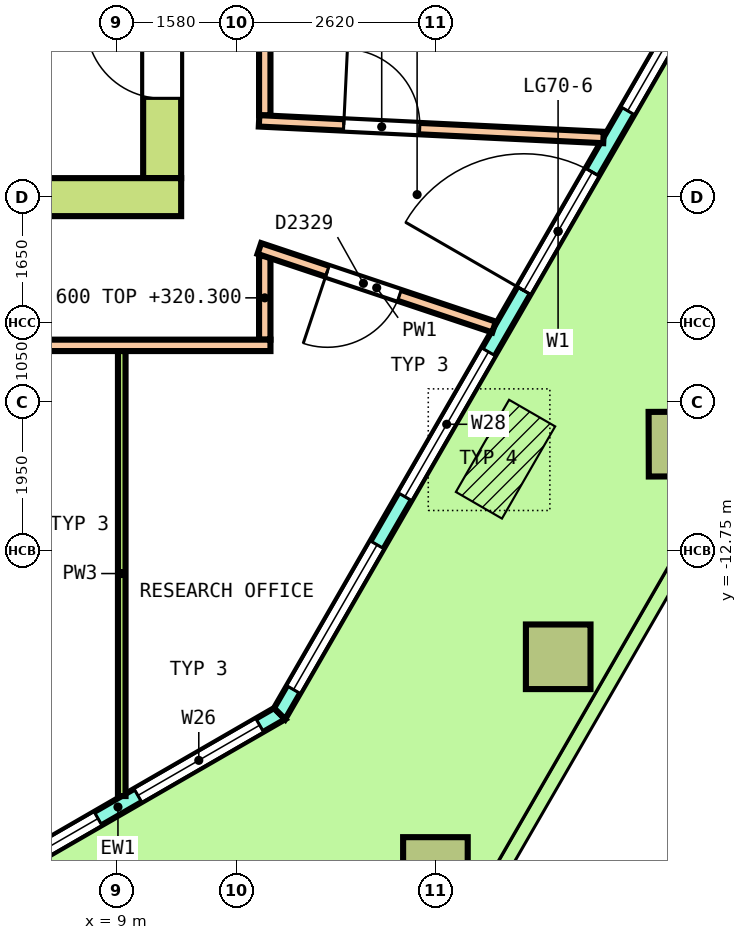
"""IFC4 building model, lengths in metres.
Left out: names, types, materials, properties, quantities, classifications, styles, units other than length and angle.
Written with IfcOpenShell. Run it as: python <this file> out.ifc"""

import sys

from ifc_helpers import new_model, si_unit, direction, frame, frame_2d, origin, origin_2d, place, context, subcontext, project, spatial, polyline, rectangle, outline, extrude, element, fill, save


model = new_model("IFC4")
c1 = context("Model", 3, precision=1e-05, world=origin(), true_north=direction((0.0, 1.0)))
c2 = subcontext(c1, "Body", "Model", "MODEL_VIEW")
j1 = project(units=[si_unit("LENGTHUNIT", "METRE"), si_unit("PLANEANGLEUNIT", "RADIAN")], contexts=[c1])
p1 = place(None, origin())
s1 = spatial("IfcSite", under=j1, at=p1, CompositionType="ELEMENT")
p2 = place(p1, origin())
s2 = spatial("IfcBuilding", under=s1, at=p2, CompositionType="ELEMENT")
p3 = place(p2, frame((0.0, 0.0, 316.6)))
s3 = spatial("IfcBuildingStorey", under=s2, at=p3, CompositionType="ELEMENT", Elevation=316.6)
p4 = place(p3, frame((13.195, -16.945, 0.0), z_axis=(-0.018115165867, -0.031417446337, 0.999342176049), x_axis=(0.499559043097, 0.865520391176, 0.036265891942)))
e1 = element("IfcColumn", 1, at=p4, inside=s3, PredefinedType="COLUMN", context=c2, shape_type="SweptSolid", body=[
    extrude(rectangle(XDim=0.85, YDim=0.85, at=origin_2d()), origin(), (0.0, 0.0, 1.0), 3.652),
])
p5 = place(p3, frame((14.811, -14.147, 0.0), z_axis=(-0.010833557325, -0.018858414602, 0.999763469144), x_axis=(0.498285075857, 0.866740432575, 0.0217486946)))
e2 = element("IfcColumn", 2, at=p5, inside=s3, PredefinedType="COLUMN", context=c2, shape_type="SweptSolid", body=[
    extrude(rectangle(XDim=0.85, YDim=0.85, at=origin_2d()), origin(), (0.0, 0.0, 1.0), 3.651),
])
p6 = place(p3, frame((16.426, -11.349, 0.0), z_axis=(-0.003678832152, -0.006287458586, 0.999973466677), x_axis=(0.502203462203, 0.864718808148, 0.007284599223)))
e3 = element("IfcColumn", 3, at=p6, inside=s3, PredefinedType="COLUMN", context=c2, shape_type="SweptSolid", body=[
    extrude(rectangle(XDim=0.85, YDim=0.85, at=origin_2d()), origin(), (0.0, 0.0, 1.0), 3.65),
])
p7 = place(p3, frame((6.892, -17.351, 0.0), z_axis=(0.0, 0.0, 1.0), x_axis=(0.866029143232, 0.499993523031, 0.0)))
e4 = element("IfcWall", 4, at=p7, inside=s3, PredefinedType="SOLIDWALL", context=c2, shape_type="SweptSolid", body=[
    extrude(outline(polyline([(-0.027, -0.1), (1.214, -0.1), (2.456, -0.1), (3.697, -0.1), (4.938, -0.1), (4.885, 0.1), (3.67, 0.1), (2.456, 0.1), (1.241, 0.1), (0.027, 0.1), (-0.027, -0.1)])), origin(), (0.0, 0.0, 1.0), 3.7),
])
p8 = place(p7, frame((0.303, 0.0, 0.1)))
e5 = element("IfcOpeningElement", 5, at=p8, cuts=e4, PredefinedType="OPENING", context=c2, shape_type="SweptSolid", body=[
    extrude(rectangle(XDim=1.85, YDim=2.9, at=frame_2d((0.925, 1.45))), frame((0.0, 0.11, 0.0), z_axis=(0.0, -1.0, 0.0), x_axis=(1.0, 0.0, 0.0)), (0.0, 0.0, 1.0), 0.22),
])
p9 = place(p7, frame((2.759, 0.0, 0.1)))
e6 = element("IfcOpeningElement", 6, at=p9, cuts=e4, PredefinedType="OPENING", context=c2, shape_type="SweptSolid", body=[
    extrude(rectangle(XDim=1.85, YDim=2.9, at=frame_2d((0.925, 1.45))), frame((0.0, 0.11, 0.0), z_axis=(0.0, -1.0, 0.0), x_axis=(1.0, 0.0, 0.0)), (0.0, 0.0, 1.0), 0.22),
])
p10 = place(p3, frame((11.146, -14.896, 0.0), z_axis=(0.0, 0.0, 1.0), x_axis=(0.499995013995, 0.866028282437, 0.0)))
e7 = element("IfcWall", 7, at=p10, inside=s3, PredefinedType="SOLIDWALL", context=c2, shape_type="SweptSolid", body=[
    extrude(outline(polyline([(-0.027, -0.1), (1.024, -0.1), (2.074, -0.1), (3.125, -0.1), (4.176, -0.1), (5.226, -0.1), (6.277, -0.1), (7.327, -0.1), (8.378, -0.1), (9.428, -0.1), (10.479, -0.1), (11.53, -0.1), (12.58, -0.1), (13.631, -0.1), (14.681, -0.1), (14.628, 0.1), (13.585, 0.1), (12.542, 0.1), (11.499, 0.1), (10.456, 0.1), (9.413, 0.1), (8.37, 0.1), (7.327, 0.1), (6.284, 0.1), (5.241, 0.1), (4.198, 0.1), (3.156, 0.1), (2.113, 0.1), (1.07, 0.1), (0.027, 0.1), (-0.027, -0.1)])), origin(), (0.0, 0.0, 1.0), 3.7),
])
p11 = place(p10, frame((0.365, 0.0, 0.1)))
e8 = element("IfcOpeningElement", 8, at=p11, cuts=e7, PredefinedType="OPENING", context=c2, shape_type="SweptSolid", body=[
    extrude(rectangle(XDim=2.2, YDim=2.9, at=frame_2d((1.1, 1.45))), frame((0.0, 0.11, 0.0), z_axis=(0.0, -1.0, 0.0), x_axis=(1.0, 0.0, 0.0)), (0.0, 0.0, 1.0), 0.22),
])
p12 = place(p10, frame((3.296, 0.0, 0.1)))
e9 = element("IfcOpeningElement", 9, at=p12, cuts=e7, PredefinedType="OPENING", context=c2, shape_type="SweptSolid", body=[
    extrude(rectangle(XDim=2.2, YDim=2.9, at=frame_2d((1.1, 1.45))), frame((0.0, 0.11, 0.0), z_axis=(0.0, -1.0, 0.0), x_axis=(1.0, 0.0, 0.0)), (0.0, 0.0, 1.0), 0.22),
])
p13 = place(p10, frame((6.427, 0.0, 0.0)))
e10 = element("IfcOpeningElement", 10, at=p13, cuts=e7, PredefinedType="OPENING", context=c2, shape_type="SweptSolid", body=[
    extrude(rectangle(XDim=1.8, YDim=2.4, at=frame_2d((0.9, 1.2))), frame((0.0, 0.11, 0.0), z_axis=(0.0, -1.0, 0.0), x_axis=(1.0, 0.0, 0.0)), (0.0, 0.0, 1.0), 0.22),
])
p14 = place(p10, frame((6.427, 0.0, 2.55)))
e11 = element("IfcOpeningElement", 11, at=p14, cuts=e7, PredefinedType="OPENING", context=c2, shape_type="SweptSolid", body=[
    extrude(rectangle(XDim=1.8, YDim=0.45, at=frame_2d((0.9, 0.225))), frame((0.0, 0.11, 0.0), z_axis=(0.0, -1.0, 0.0), x_axis=(1.0, 0.0, 0.0)), (0.0, 0.0, 1.0), 0.22),
])
p15 = place(p10, frame((9.158, 0.0, 0.1)))
e12 = element("IfcOpeningElement", 12, at=p15, cuts=e7, PredefinedType="OPENING", context=c2, shape_type="SweptSolid", body=[
    extrude(rectangle(XDim=2.2, YDim=2.9, at=frame_2d((1.1, 1.45))), frame((0.0, 0.11, 0.0), z_axis=(0.0, -1.0, 0.0), x_axis=(1.0, 0.0, 0.0)), (0.0, 0.0, 1.0), 0.22),
])
p16 = place(p10, frame((12.089, 0.0, 0.1)))
e13 = element("IfcOpeningElement", 13, at=p16, cuts=e7, PredefinedType="OPENING", context=c2, shape_type="SweptSolid", body=[
    extrude(rectangle(XDim=2.2, YDim=2.9, at=frame_2d((1.1, 1.45))), frame((0.0, 0.11, 0.0), z_axis=(0.0, -1.0, 0.0), x_axis=(1.0, 0.0, 0.0)), (0.0, 0.0, 1.0), 0.22),
])
p17 = place(p3, frame((-9.85, -8.1, 0.0), z_axis=(0.0, 0.0, 1.0), x_axis=(1.0, 0.0, 0.0)))
e14 = element("IfcWall", 14, at=p17, inside=s3, PredefinedType="SHEAR", context=c2, shape_type="SweptSolid", body=[
    extrude(rectangle(XDim=19.7, YDim=0.5, at=frame_2d((9.85, 0.0))), origin(), (0.0, 0.0, 1.0), 3.7),
])
p18 = place(p17, frame((11.4, 0.0, 0.0)))
e15 = element("IfcOpeningElement", 15, at=p18, cuts=e14, PredefinedType="OPENING", context=c2, shape_type="SweptSolid", body=[
    extrude(rectangle(XDim=1.2, YDim=2.1, at=frame_2d((0.6, 1.05))), frame((0.0, 0.26, 0.0), z_axis=(0.0, -1.0, 0.0), x_axis=(1.0, 0.0, 0.0)), (0.0, 0.0, 1.0), 0.52),
])
p19 = place(p3, frame((9.6, -7.85, 0.0), z_axis=(0.0, 0.0, 1.0), x_axis=(0.0, 1.0, 0.0)))
e16 = element("IfcWall", 16, at=p19, inside=s3, PredefinedType="SHEAR", context=c2, shape_type="SweptSolid", body=[
    extrude(rectangle(XDim=15.7, YDim=0.5, at=frame_2d((7.85, 0.0))), origin(), (0.0, 0.0, 1.0), 3.7),
])
p20 = place(p19, frame((6.65, 0.0, 0.0)))
e17 = element("IfcOpeningElement", 17, at=p20, cuts=e16, PredefinedType="OPENING", context=c2, shape_type="SweptSolid", body=[
    extrude(rectangle(XDim=2.4, YDim=2.1, at=frame_2d((1.2, 1.05))), frame((0.0, 0.26, 0.0), z_axis=(0.0, -1.0, 0.0), x_axis=(1.0, 0.0, 0.0)), (0.0, 0.0, 1.0), 0.52),
])
p21 = place(p19, frame((13.55, 0.0, 0.0)))
e18 = element("IfcOpeningElement", 18, at=p21, cuts=e16, PredefinedType="OPENING", context=c2, shape_type="SweptSolid", body=[
    extrude(rectangle(XDim=1.2, YDim=2.1, at=frame_2d((0.6, 1.05))), frame((0.0, 0.26, 0.0), z_axis=(0.0, -1.0, 0.0), x_axis=(1.0, 0.0, 0.0)), (0.0, 0.0, 1.0), 0.52),
])
p22 = place(p19, frame((1.05, 0.0, 0.0)))
e19 = element("IfcOpeningElement", 19, at=p22, cuts=e16, PredefinedType="OPENING", context=c2, shape_type="SweptSolid", body=[
    extrude(rectangle(XDim=1.0, YDim=2.1, at=frame_2d((0.5, 1.05))), frame((0.0, 0.26, 0.0), z_axis=(0.0, -1.0, 0.0), x_axis=(1.0, 0.0, 0.0)), (0.0, 0.0, 1.0), 0.52),
])
p23 = place(p3, frame((10.95, -9.975, 0.0), z_axis=(0.0, 0.0, 1.0), x_axis=(0.0, 1.0, 0.0)))
e20 = element("IfcWall", 20, at=p23, inside=s3, PredefinedType="PARTITIONING", context=c2, shape_type="SweptSolid", body=[
    extrude(rectangle(XDim=1.1, YDim=0.15, at=frame_2d((0.55, 0.0))), origin(), (0.0, 0.0, 1.0), 3.7),
])
p24 = place(p3, frame((10.95, -7.025, 0.0), z_axis=(0.0, 0.0, 1.0), x_axis=(0.0, 1.0, 0.0)))
e21 = element("IfcWall", 21, at=p24, inside=s3, PredefinedType="PARTITIONING", context=c2, shape_type="SweptSolid", body=[
    extrude(rectangle(XDim=17.0, YDim=0.15, at=frame_2d((8.5, 0.0))), origin(), (0.0, 0.0, 1.0), 3.05),
])
p25 = place(p24, frame((8.018, 0.0, 0.0)))
e22 = element("IfcOpeningElement", 22, at=p25, cuts=e21, PredefinedType="OPENING", context=c2, shape_type="SweptSolid", body=[
    extrude(rectangle(XDim=1.0, YDim=2.1, at=frame_2d((0.5, 1.05))), frame((0.0, 0.085, 0.0), z_axis=(0.0, -1.0, 0.0), x_axis=(1.0, 0.0, 0.0)), (0.0, 0.0, 1.0), 0.17),
])
p26 = place(p24, frame((11.192, 0.0, 0.0)))
e23 = element("IfcOpeningElement", 23, at=p26, cuts=e21, PredefinedType="OPENING", context=c2, shape_type="SweptSolid", body=[
    extrude(rectangle(XDim=1.0, YDim=2.1, at=frame_2d((0.5, 1.05))), frame((0.0, 0.085, 0.0), z_axis=(0.0, -1.0, 0.0), x_axis=(1.0, 0.0, 0.0)), (0.0, 0.0, 1.0), 0.17),
])
p27 = place(p24, frame((5.653, 0.0, 0.0)))
e24 = element("IfcOpeningElement", 24, at=p27, cuts=e21, PredefinedType="OPENING", context=c2, shape_type="SweptSolid", body=[
    extrude(rectangle(XDim=1.0, YDim=2.1, at=frame_2d((0.5, 1.05))), frame((0.0, 0.085, 0.0), z_axis=(0.0, -1.0, 0.0), x_axis=(1.0, 0.0, 0.0)), (0.0, 0.0, 1.0), 0.17),
])
p28 = place(p3, frame((-10.9, -10.05, 0.0), z_axis=(0.0, 0.0, 1.0), x_axis=(1.0, 0.0, 0.0)))
e25 = element("IfcWall", 25, at=p28, inside=s3, PredefinedType="PARTITIONING", context=c2, shape_type="SweptSolid", body=[
    extrude(rectangle(XDim=21.925, YDim=0.15, at=frame_2d((10.962, 0.0))), origin(), (0.0, 0.0, 1.0), 3.05),
])
p29 = place(p28, frame((2.049, 0.0, 0.0)))
e26 = element("IfcOpeningElement", 26, at=p29, cuts=e25, PredefinedType="OPENING", context=c2, shape_type="SweptSolid", body=[
    extrude(rectangle(XDim=1.0, YDim=2.1, at=frame_2d((0.5, 1.05))), frame((0.0, 0.085, 0.0), z_axis=(0.0, -1.0, 0.0), x_axis=(1.0, 0.0, 0.0)), (0.0, 0.0, 1.0), 0.17),
])
p30 = place(p28, frame((7.208, 0.0, 0.0)))
e27 = element("IfcOpeningElement", 27, at=p30, cuts=e25, PredefinedType="OPENING", context=c2, shape_type="SweptSolid", body=[
    extrude(rectangle(XDim=1.0, YDim=2.1, at=frame_2d((0.5, 1.05))), frame((0.0, 0.085, 0.0), z_axis=(0.0, -1.0, 0.0), x_axis=(1.0, 0.0, 0.0)), (0.0, 0.0, 1.0), 0.17),
])
p31 = place(p28, frame((10.56, 0.0, 0.0)))
e28 = element("IfcOpeningElement", 28, at=p31, cuts=e25, PredefinedType="OPENING", context=c2, shape_type="SweptSolid", body=[
    extrude(rectangle(XDim=1.0, YDim=2.1, at=frame_2d((0.5, 1.05))), frame((0.0, 0.085, 0.0), z_axis=(0.0, -1.0, 0.0), x_axis=(1.0, 0.0, 0.0)), (0.0, 0.0, 1.0), 0.17),
])
p32 = place(p28, frame((15.626, 0.0, 0.0)))
e29 = element("IfcOpeningElement", 29, at=p32, cuts=e25, PredefinedType="OPENING", context=c2, shape_type="SweptSolid", body=[
    extrude(rectangle(XDim=1.0, YDim=2.1, at=frame_2d((0.5, 1.05))), frame((0.0, 0.085, 0.0), z_axis=(0.0, -1.0, 0.0), x_axis=(1.0, 0.0, 0.0)), (0.0, 0.0, 1.0), 0.17),
])
p33 = place(p3, frame((10.879, -8.776, 0.0), z_axis=(0.0, 0.0, 1.0), x_axis=(0.948345348637, -0.317239814207, 0.0)))
e30 = element("IfcWall", 30, at=p33, inside=s3, PredefinedType="PARTITIONING", context=c2, shape_type="SweptSolid", body=[
    extrude(rectangle(XDim=3.256, YDim=0.15, at=frame_2d((1.628, 0.0))), origin(), (0.0, 0.0, 1.0), 3.05),
])
p34 = place(p33, frame((0.943, 0.0, 0.0)))
e31 = element("IfcOpeningElement", 31, at=p34, cuts=e30, PredefinedType="OPENING", context=c2, shape_type="SweptSolid", body=[
    extrude(rectangle(XDim=1.0, YDim=2.1, at=frame_2d((0.5, 1.05))), frame((0.0, 0.085, 0.0), z_axis=(0.0, -1.0, 0.0), x_axis=(1.0, 0.0, 0.0)), (0.0, 0.0, 1.0), 0.17),
])
p35 = place(p3, frame((10.875, -7.096, 0.0), z_axis=(0.0, 0.0, 1.0), x_axis=(0.998834285397, -0.048270801897, 0.0)))
e32 = element("IfcWall", 32, at=p35, inside=s3, PredefinedType="PARTITIONING", context=c2, shape_type="SweptSolid", body=[
    extrude(rectangle(XDim=4.537, YDim=0.15, at=frame_2d((2.269, 0.0))), origin(), (0.0, 0.0, 1.0), 3.05),
])
p36 = place(p35, frame((1.115, 0.0, 0.0)))
e33 = element("IfcOpeningElement", 33, at=p36, cuts=e32, PredefinedType="OPENING", context=c2, shape_type="SweptSolid", body=[
    extrude(rectangle(XDim=1.0, YDim=2.1, at=frame_2d((0.5, 1.05))), frame((0.0, 0.085, 0.0), z_axis=(0.0, -1.0, 0.0), x_axis=(1.0, 0.0, 0.0)), (0.0, 0.0, 1.0), 0.17),
])
p37 = place(p3, frame((9.069, -15.979, 0.0), z_axis=(0.0, 0.0, 1.0), x_axis=(0.0, 1.0, 0.0)))
e34 = element("IfcWall", 34, at=p37, inside=s3, PredefinedType="PARTITIONING", context=c2, shape_type="SweptSolid", body=[
    extrude(rectangle(XDim=5.854, YDim=0.1, at=frame_2d((2.927, 0.0))), origin(), (0.0, 0.0, 1.0), 3.05),
])
p38 = place(p8, origin())
e35 = element("IfcWindow", 35, at=p38, inside=s3, PartitioningType="SINGLE_PANEL", PredefinedType="WINDOW", context=c2, shape_type="SweptSolid", body=[
    extrude(rectangle(XDim=1.85, YDim=2.9, at=frame_2d((0.925, 1.45))), frame((0.0, 0.03, 0.0), z_axis=(0.0, -1.0, 0.0), x_axis=(1.0, 0.0, 0.0)), (0.0, 0.0, 1.0), 0.06),
])
fill(e5, e35)
p39 = place(p9, origin())
e36 = element("IfcWindow", 36, at=p39, inside=s3, PartitioningType="SINGLE_PANEL", PredefinedType="WINDOW", context=c2, shape_type="SweptSolid", body=[
    extrude(rectangle(XDim=1.85, YDim=2.9, at=frame_2d((0.925, 1.45))), frame((0.0, 0.03, 0.0), z_axis=(0.0, -1.0, 0.0), x_axis=(1.0, 0.0, 0.0)), (0.0, 0.0, 1.0), 0.06),
])
fill(e6, e36)
p40 = place(p11, origin())
e37 = element("IfcWindow", 37, at=p40, inside=s3, PartitioningType="SINGLE_PANEL", PredefinedType="WINDOW", context=c2, shape_type="SweptSolid", body=[
    extrude(rectangle(XDim=2.2, YDim=2.9, at=frame_2d((1.1, 1.45))), frame((0.0, 0.03, 0.0), z_axis=(0.0, -1.0, 0.0), x_axis=(1.0, 0.0, 0.0)), (0.0, 0.0, 1.0), 0.06),
])
fill(e8, e37)
p41 = place(p12, origin())
e38 = element("IfcWindow", 38, at=p41, inside=s3, PartitioningType="SINGLE_PANEL", PredefinedType="WINDOW", context=c2, shape_type="SweptSolid", body=[
    extrude(rectangle(XDim=2.2, YDim=2.9, at=frame_2d((1.1, 1.45))), frame((0.0, 0.03, 0.0), z_axis=(0.0, -1.0, 0.0), x_axis=(1.0, 0.0, 0.0)), (0.0, 0.0, 1.0), 0.06),
])
fill(e9, e38)
p42 = place(p13, origin())
e39 = element("IfcDoor", 39, at=p42, inside=s3, OperationType="DOUBLE_DOOR_SINGLE_SWING", PredefinedType="DOOR", context=c2, shape_type="SweptSolid", body=[
    extrude(rectangle(XDim=1.8, YDim=2.4, at=frame_2d((0.9, 1.2))), frame((0.0, 0.025, 0.0), z_axis=(0.0, -1.0, 0.0), x_axis=(1.0, 0.0, 0.0)), (0.0, 0.0, 1.0), 0.05),
])
fill(e10, e39)
p43 = place(p14, origin())
e40 = element("IfcWindow", 40, at=p43, inside=s3, PartitioningType="SINGLE_PANEL", PredefinedType="WINDOW", context=c2, shape_type="SweptSolid", body=[
    extrude(rectangle(XDim=1.8, YDim=0.45, at=frame_2d((0.9, 0.225))), frame((0.0, 0.03, 0.0), z_axis=(0.0, -1.0, 0.0), x_axis=(1.0, 0.0, 0.0)), (0.0, 0.0, 1.0), 0.06),
])
fill(e11, e40)
p44 = place(p15, origin())
e41 = element("IfcWindow", 41, at=p44, inside=s3, PartitioningType="SINGLE_PANEL", PredefinedType="WINDOW", context=c2, shape_type="SweptSolid", body=[
    extrude(rectangle(XDim=2.2, YDim=2.9, at=frame_2d((1.1, 1.45))), frame((0.0, 0.03, 0.0), z_axis=(0.0, -1.0, 0.0), x_axis=(1.0, 0.0, 0.0)), (0.0, 0.0, 1.0), 0.06),
])
fill(e12, e41)
p45 = place(p22, origin())
e42 = element("IfcDoor", 42, at=p45, inside=s3, OperationType="SINGLE_SWING_RIGHT", PredefinedType="DOOR", context=c2, shape_type="SweptSolid", body=[
    extrude(rectangle(XDim=1.0, YDim=2.1, at=frame_2d((0.5, 1.05))), frame((0.0, 0.2, 0.0), z_axis=(0.0, -1.0, 0.0), x_axis=(1.0, 0.0, 0.0)), (0.0, 0.0, 1.0), 0.4),
])
fill(e19, e42)
p46 = place(p34, origin())
e43 = element("IfcDoor", 43, at=p46, inside=s3, OperationType="SINGLE_SWING_RIGHT", PredefinedType="DOOR", context=c2, shape_type="SweptSolid", body=[
    extrude(rectangle(XDim=1.0, YDim=2.1, at=frame_2d((0.5, 1.05))), frame((0.0, 0.025, 0.0), z_axis=(0.0, -1.0, 0.0), x_axis=(1.0, 0.0, 0.0)), (0.0, 0.0, 1.0), 0.05),
])
fill(e31, e43)
p47 = place(p36, origin())
e44 = element("IfcDoor", 44, at=p47, inside=s3, OperationType="SINGLE_SWING_RIGHT", PredefinedType="DOOR", context=c2, shape_type="SweptSolid", body=[
    extrude(rectangle(XDim=1.0, YDim=2.1, at=frame_2d((0.5, 1.05))), frame((0.0, 0.025, 0.0), z_axis=(0.0, -1.0, 0.0), x_axis=(1.0, 0.0, 0.0)), (0.0, 0.0, 1.0), 0.05),
])
fill(e33, e44)
save(model, sys.argv[1])
